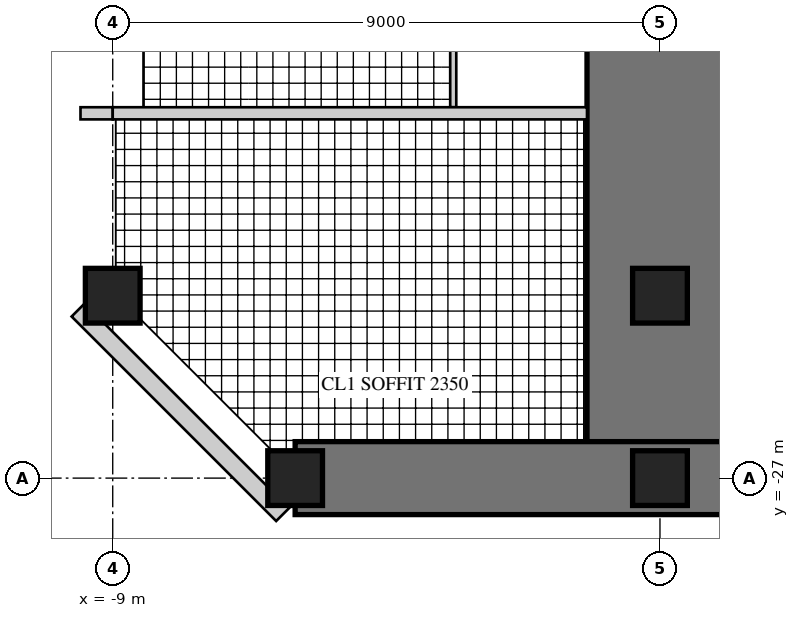
"""IFC4 building model, lengths in metres.
Left out: names, types, materials, properties, quantities, classifications, styles, units other than length and angle.
Written with IfcOpenShell. Run it as: python <this file> out.ifc"""

import sys

from ifc_helpers import new_model, si_unit, direction, frame, frame_2d, origin, origin_2d, place, context, subcontext, project, spatial, rectangle, hollow_rectangle, extrude, element, fill, save


model = new_model("IFC4")
c1 = context("Model", 3, precision=1e-05, world=origin(), true_north=direction((0.0, 1.0)))
c2 = subcontext(c1, "Body", "Model", "MODEL_VIEW")
j1 = project(units=[si_unit("LENGTHUNIT", "METRE"), si_unit("PLANEANGLEUNIT", "RADIAN")], contexts=[c1])
p1 = place(None, origin())
s1 = spatial("IfcSite", under=j1, at=p1, CompositionType="ELEMENT")
p2 = place(p1, origin())
s2 = spatial("IfcBuilding", under=s1, at=p2, CompositionType="ELEMENT")
p3 = place(p2, frame((0.0, 0.0, 206.9)))
s3 = spatial("IfcBuildingStorey", under=s2, at=p3, CompositionType="ELEMENT", Elevation=206.9)
p4 = place(p3, frame((0.0, -13.05, 0.0), z_axis=(0.0, 0.0, 1.0), x_axis=(0.0, -1.0, 0.0)))
e1 = element("IfcWall", 1, at=p4, inside=s3, PredefinedType="SHEAR", context=c2, shape_type="SweptSolid", body=[
    extrude(rectangle(XDim=13.95, YDim=2.4, at=frame_2d((6.975, 0.0))), origin(), (0.0, 0.0, 1.0), 3.4),
])
p5 = place(p4, frame((0.3, 0.0, 0.0)))
e2 = element("IfcOpeningElement", 2, at=p5, cuts=e1, PredefinedType="OPENING", context=c2, shape_type="SweptSolid", body=[
    extrude(rectangle(XDim=1.0, YDim=2.15, at=frame_2d((0.5, 1.075))), frame((0.0, 1.21, 0.0), z_axis=(0.0, -1.0, 0.0), x_axis=(1.0, 0.0, 0.0)), (0.0, 0.0, 1.0), 2.42),
])
p6 = place(p4, frame((2.55, 0.0, 0.0)))
e3 = element("IfcOpeningElement", 3, at=p6, cuts=e1, PredefinedType="OPENING", context=c2, shape_type="SweptSolid", body=[
    extrude(rectangle(XDim=1.0, YDim=2.15, at=frame_2d((0.5, 1.075))), frame((0.0, 1.21, 0.0), z_axis=(0.0, -1.0, 0.0), x_axis=(1.0, 0.0, 0.0)), (0.0, 0.0, 1.0), 2.42),
])
p7 = place(p4, frame((9.2, 0.0, 0.0)))
e4 = element("IfcOpeningElement", 4, at=p7, cuts=e1, PredefinedType="OPENING", context=c2, shape_type="SweptSolid", body=[
    extrude(rectangle(XDim=1.0, YDim=2.2, at=frame_2d((0.5, 1.1))), frame((0.0, 1.21, 0.0), z_axis=(0.0, -1.0, 0.0), x_axis=(1.0, 0.0, 0.0)), (0.0, 0.0, 1.0), 2.42),
])
p8 = place(p3, frame((-6.0, -27.0, 0.0), z_axis=(0.0, 0.0, 1.0), x_axis=(1.0, 0.0, 0.0)))
e5 = element("IfcWall", 5, at=p8, inside=s3, PredefinedType="SHEAR", context=c2, shape_type="SweptSolid", body=[
    extrude(rectangle(XDim=12.0, YDim=1.2, at=frame_2d((6.0, 0.0))), origin(), (0.0, 0.0, 1.0), 3.4),
])
p9 = place(p8, frame((1.225, 0.0, 0.6)))
e6 = element("IfcOpeningElement", 6, at=p9, cuts=e5, PredefinedType="OPENING", context=c2, shape_type="SweptSolid", body=[
    extrude(rectangle(XDim=3.0, YDim=2.4, at=frame_2d((1.5, 1.2))), frame((0.0, 0.61, 0.0), z_axis=(0.0, -1.0, 0.0), x_axis=(1.0, 0.0, 0.0)), (0.0, 0.0, 1.0), 1.22),
])
p10 = place(p8, frame((7.775, 0.0, 0.6)))
e7 = element("IfcOpeningElement", 7, at=p10, cuts=e5, PredefinedType="OPENING", context=c2, shape_type="SweptSolid", body=[
    extrude(rectangle(XDim=3.0, YDim=2.4, at=frame_2d((1.5, 1.2))), frame((0.0, 0.61, 0.0), z_axis=(0.0, -1.0, 0.0), x_axis=(1.0, 0.0, 0.0)), (0.0, 0.0, 1.0), 1.22),
])
for number, where, z_axis, x_axis in (
    (8, (-9.0, -24.0, 0.0), (0.0, 0.0, 1.0), (1.0, 0.0, 0.0)),
    (9, (-6.0, -27.0, 0.0), (0.0, 0.0, 1.0), (1.0, 0.0, 0.0)),
    (10, (0.0, -27.0, 0.0), (0.0, 0.0, 1.0), (1.0, 0.0, 0.0)),
    (11, (0.0, -24.0, 0.0), (0.0, 0.0, 1.0), (1.0, 0.0, 0.0)),
):
    element("IfcColumn", number, at=place(p3, frame(where, z_axis=z_axis, x_axis=x_axis)), inside=s3, PredefinedType="COLUMN", context=c2, shape_type="SweptSolid", body=[
        extrude(rectangle(XDim=0.9, YDim=0.9, at=origin_2d()), origin(), (0.0, 0.0, 1.0), 3.4),
    ])
p11 = place(p3, frame((-9.57, -24.236, 0.0), z_axis=(0.0, 0.0, 1.0), x_axis=(0.707106781187, -0.707106781187, 0.0)))
e12 = element("IfcWall", 12, at=p11, inside=s3, PredefinedType="SOLIDWALL", context=c2, shape_type="SweptSolid", body=[
    extrude(rectangle(XDim=4.757, YDim=0.3, at=frame_2d((2.379, 0.0))), origin(), (0.0, 0.0, 1.0), 3.22),
])
p12 = place(p11, frame((1.929, 0.0, 0.3)))
e13 = element("IfcOpeningElement", 13, at=p12, cuts=e12, PredefinedType="OPENING", context=c2, shape_type="SweptSolid", body=[
    extrude(rectangle(XDim=0.9, YDim=2.4, at=frame_2d((0.45, 1.2))), frame((0.0, 0.16, 0.0), z_axis=(0.0, -1.0, 0.0), x_axis=(1.0, 0.0, 0.0)), (0.0, 0.0, 1.0), 0.32),
])
p13 = place(p3, frame((-3.4, -18.45, 0.0), z_axis=(0.0, 0.0, 1.0), x_axis=(0.0, -1.0, 0.0)))
e14 = element("IfcWall", 14, at=p13, inside=s3, PredefinedType="PARTITIONING", context=c2, shape_type="SweptSolid", body=[
    extrude(rectangle(XDim=2.45, YDim=0.1, at=frame_2d((1.225, 0.0))), origin(), (0.0, 0.0, 1.0), 3.22),
])
p14 = place(p3, frame((-9.53, -21.0, 0.0), z_axis=(0.0, 0.0, 1.0), x_axis=(1.0, 0.0, 0.0)))
e15 = element("IfcWall", 15, at=p14, inside=s3, PredefinedType="SOLIDWALL", context=c2, shape_type="SweptSolid", body=[
    extrude(rectangle(XDim=0.53, YDim=0.2, at=frame_2d((0.265, 0.0))), origin(), (0.0, 0.0, 1.0), 3.22),
])
p15 = place(p3, frame((-9.0, -21.0, 0.0), z_axis=(0.0, 0.0, 1.0), x_axis=(1.0, 0.0, 0.0)))
e16 = element("IfcWall", 16, at=p15, inside=s3, PredefinedType="SOLIDWALL", context=c2, shape_type="SweptSolid", body=[
    extrude(rectangle(XDim=7.8, YDim=0.2, at=frame_2d((3.9, 0.0))), origin(), (0.0, 0.0, 1.0), 2.62),
])
p16 = place(p12, origin())
e17 = element("IfcWindow", 17, at=p16, inside=s3, PartitioningType="SINGLE_PANEL", PredefinedType="WINDOW", context=c2, shape_type="SweptSolid", body=[
    extrude(hollow_rectangle(XDim=0.9, YDim=2.4, WallThickness=0.06, at=frame_2d((0.45, 1.2))), frame((0.0, 0.03, 0.0), z_axis=(0.0, -1.0, 0.0), x_axis=(1.0, 0.0, 0.0)), (0.0, 0.0, 1.0), 0.06),
    extrude(rectangle(XDim=0.779, YDim=2.279, at=frame_2d((0.45, 1.2))), frame((0.0, 0.03, 0.0), z_axis=(0.0, -1.0, 0.0), x_axis=(1.0, 0.0, 0.0)), (0.0, 0.0, 1.0), 0.06),
])
fill(e13, e17)
p17 = place(p9, origin())
e18 = element("IfcWindow", 18, at=p17, inside=s3, PartitioningType="SINGLE_PANEL", PredefinedType="WINDOW", context=c2, shape_type="SweptSolid", body=[
    extrude(hollow_rectangle(XDim=3.0, YDim=2.4, WallThickness=0.06, at=frame_2d((1.5, 1.2))), frame((0.0, 0.03, 0.0), z_axis=(0.0, -1.0, 0.0), x_axis=(1.0, 0.0, 0.0)), (0.0, 0.0, 1.0), 0.06),
    extrude(rectangle(XDim=2.879, YDim=2.279, at=frame_2d((1.5, 1.2))), frame((0.0, 0.03, 0.0), z_axis=(0.0, -1.0, 0.0), x_axis=(1.0, 0.0, 0.0)), (0.0, 0.0, 1.0), 0.06),
])
fill(e6, e18)
p18 = place(p7, origin())
e19 = element("IfcDoor", 19, at=p18, inside=s3, OperationType="SINGLE_SWING_LEFT", PredefinedType="DOOR", context=c2, shape_type="SweptSolid", body=[
    extrude(rectangle(XDim=1.0, YDim=2.2, at=frame_2d((0.5, 1.1))), frame((0.0, 0.025, 0.0), z_axis=(0.0, -1.0, 0.0), x_axis=(1.0, 0.0, 0.0)), (0.0, 0.0, 1.0), 0.05),
])
fill(e4, e19)
save(model, sys.argv[1])
